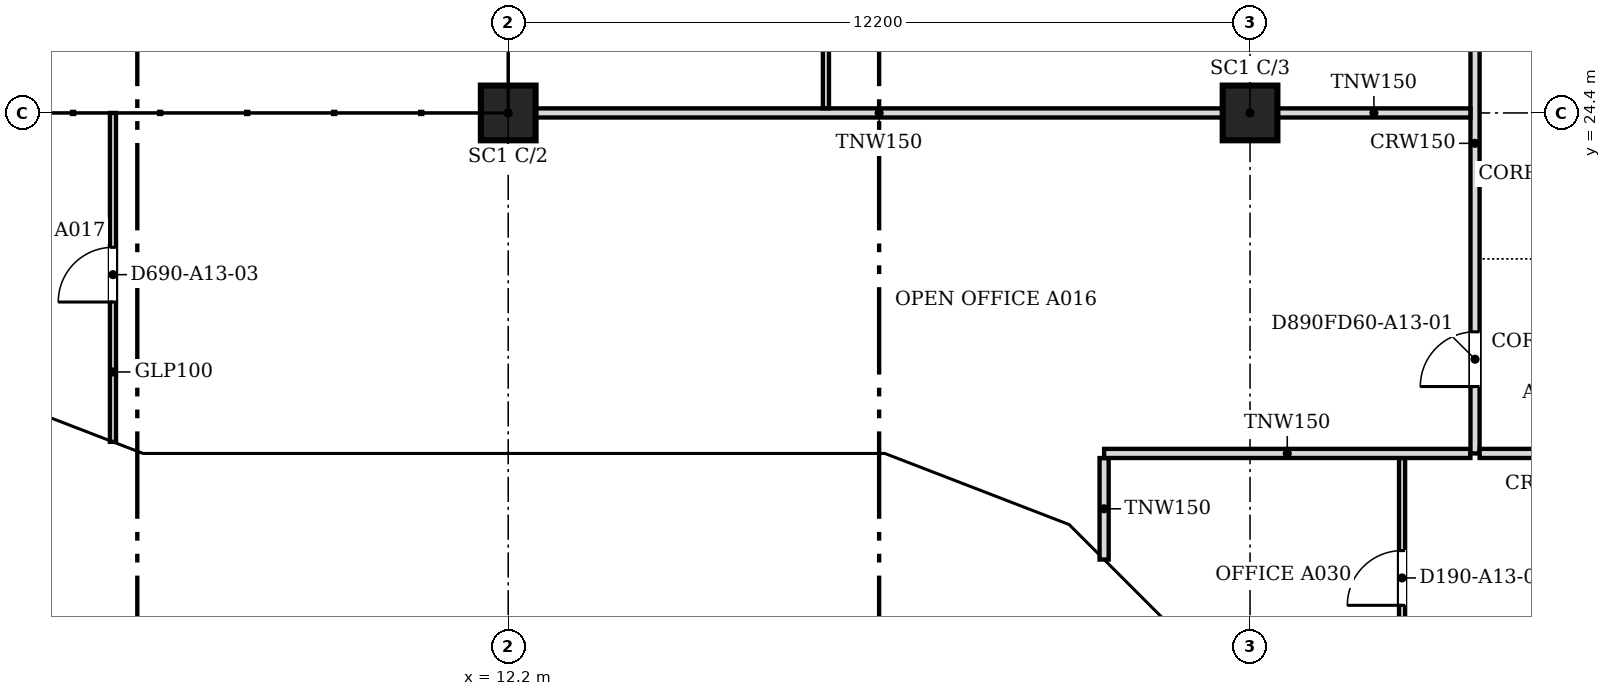
"""IFC4 building model, lengths in metres.
Left out: names, types, materials, properties, quantities, classifications, styles, units other than length and angle.
Written with IfcOpenShell. Run it as: python <this file> out.ifc"""

import sys

from ifc_helpers import new_model, si_unit, direction, frame, frame_2d, origin, origin_2d, place, context, subcontext, project, spatial, polyline, rectangle, outline, extrude, faceted_brep, source, transform, mapped, element, fill, save


model = new_model("IFC4")
c1 = context("Model", 3, precision=1e-05, world=origin(), true_north=direction((0.0, 1.0)))
c2 = subcontext(c1, "Body", "Model", "MODEL_VIEW")
j1 = project(units=[si_unit("LENGTHUNIT", "METRE"), si_unit("PLANEANGLEUNIT", "RADIAN")], contexts=[c1])
p1 = place(None, origin())
s1 = spatial("IfcSite", under=j1, at=p1, CompositionType="ELEMENT")
p2 = place(p1, origin())
s2 = spatial("IfcBuilding", under=s1, at=p2, CompositionType="ELEMENT")
p3 = place(p2, frame((0.0, 0.0, 143.0)))
s3 = spatial("IfcBuildingStorey", under=s2, at=p3, CompositionType="ELEMENT", Elevation=143.0)
for number, where, z_axis, x_axis in (
    (1, (12.2, 24.4, 0.0), (0.0, 0.0, 1.0), (1.0, 0.0, 0.0)),
    (2, (24.4, 24.4, 0.0), (0.0, 0.0, 1.0), (1.0, 0.0, 0.0)),
):
    element("IfcColumn", number, at=place(p3, frame(where, z_axis=z_axis, x_axis=x_axis)), inside=s3, PredefinedType="COLUMN", context=c2, shape_type="SweptSolid", body=[
        extrude(rectangle(XDim=0.9, YDim=0.9, at=origin_2d()), origin(), (0.0, 0.0, 1.0), 3.6),
    ])
m1 = source(origin(), c2, "Body", "Brep", [
    faceted_brep([(2.95, -0.25, 0.0), (2.997, -0.25, 0.059), (2.997, -0.25, 7.541), (2.95, -0.25, 7.6), (0.0, -0.25, 3.8), (0.053, 0.25, 3.868), (2.904, 0.25, 7.54), (2.904, 0.25, 0.06), (0.053, 0.25, 3.732), (2.95, 0.0, 0.0), (2.95, 0.0, 7.6), (0.0, 0.0, 3.8)], [[[0, 1, 2, 3, 4]], [[5, 6, 7, 8]], [[1, 0, 9]], [[10, 3, 2]], [[6, 5, 11, 4, 3, 10]], [[8, 7, 9, 0, 4, 11]], [[8, 11, 5]], [[1, 9, 7, 6, 10, 2]]]),
])
p4 = place(p3, frame((3.394, 19.612, -3.8), z_axis=(0.0, 0.0, 1.0), x_axis=(0.932990326376, -0.359901446078, 0.0)))
e3 = element("IfcWall", 3, at=p4, inside=s3, PredefinedType="SOLIDWALL", context=c2, shape_type="MappedRepresentation", body=[
    mapped(m1, transform((0.0, 0.0, 0.0), scale=1.0)),
])
m2 = source(origin(), c2, "Body", "SweptSolid", [
    extrude(outline(polyline([(2.75, 6.935), (0.316, 3.8), (2.75, 0.665), (2.75, 6.935)])), frame((0.0, 0.26, 0.0), z_axis=(0.0, -1.0, 0.0), x_axis=(1.0, 0.0, 0.0)), (0.0, 0.0, 1.0), 0.52),
])
p5 = place(p4, origin())
e4 = element("IfcOpeningElement", 4, at=p5, cuts=e3, PredefinedType="OPENING", context=c2, shape_type="MappedRepresentation", body=[
    mapped(m2, transform((0.0, 0.0, 0.0), scale=1.0)),
])
m3 = source(origin(), c2, "Body", "Brep", [
    faceted_brep([(0.047, -0.25, 0.0), (3.05, -0.25, 3.8), (0.047, -0.25, 7.6), (0.0, -0.25, 7.54), (0.0, -0.25, 0.06), (0.093, 0.25, 7.541), (3.05, 0.25, 3.8), (0.093, 0.25, 0.059), (0.047, 0.0, 0.0), (0.047, 0.0, 7.6)], [[[0, 1, 2, 3, 4]], [[5, 6, 7]], [[7, 6, 1, 0, 8]], [[6, 5, 9, 2, 1]], [[3, 2, 9]], [[8, 0, 4]], [[7, 8, 4, 3, 9, 5]]]),
])
p6 = place(p3, frame((6.1, 18.55, -3.8), z_axis=(0.0, 0.0, 1.0), x_axis=(1.0, 0.0, 0.0)))
e5 = element("IfcWall", 5, at=p6, inside=s3, PredefinedType="SOLIDWALL", context=c2, shape_type="MappedRepresentation", body=[
    mapped(m3, transform((0.0, 0.0, 0.0), scale=1.0)),
])
m4 = source(origin(), c2, "Body", "SweptSolid", [
    extrude(outline(polyline([(0.247, 0.656), (2.731, 3.8), (0.247, 6.944), (0.247, 0.656)])), frame((0.0, 0.26, 0.0), z_axis=(0.0, -1.0, 0.0), x_axis=(1.0, 0.0, 0.0)), (0.0, 0.0, 1.0), 0.52),
])
p7 = place(p6, origin())
e6 = element("IfcOpeningElement", 6, at=p7, cuts=e5, PredefinedType="OPENING", context=c2, shape_type="MappedRepresentation", body=[
    mapped(m4, transform((0.0, 0.0, 0.0), scale=1.0)),
])
m5 = source(origin(), c2, "Body", "SweptSolid", [
    extrude(outline(polyline([(3.05, 0.0), (6.1, 3.8), (3.05, 7.6), (0.0, 3.8), (3.05, 0.0)])), frame((0.0, 0.25, 0.0), z_axis=(0.0, -1.0, 0.0), x_axis=(1.0, 0.0, 0.0)), (0.0, 0.0, 1.0), 0.5),
])
p8 = place(p3, frame((9.15, 18.55, -3.8), z_axis=(0.0, 0.0, 1.0), x_axis=(1.0, 0.0, 0.0)))
e7 = element("IfcWall", 7, at=p8, inside=s3, PredefinedType="SOLIDWALL", context=c2, shape_type="MappedRepresentation", body=[
    mapped(m5, transform((0.0, 0.0, 0.0), scale=1.0)),
])
m6 = source(origin(), c2, "Body", "SweptSolid", [
    extrude(outline(polyline([(3.05, 0.399), (5.78, 3.8), (3.05, 7.201), (0.321, 3.8), (3.05, 0.399)])), frame((0.0, 0.26, 0.0), z_axis=(0.0, -1.0, 0.0), x_axis=(1.0, 0.0, 0.0)), (0.0, 0.0, 1.0), 0.52),
])
p9 = place(p8, origin())
e8 = element("IfcOpeningElement", 8, at=p9, cuts=e7, PredefinedType="OPENING", context=c2, shape_type="MappedRepresentation", body=[
    mapped(m6, transform((0.0, 0.0, 0.0), scale=1.0)),
])
m7 = source(origin(), c2, "Body", "Brep", [
    faceted_brep([(3.05, -0.25, 7.543), (0.0, -0.25, 3.8), (3.05, -0.25, 0.057), (0.0, 0.25, 3.8), (3.096, 0.25, 7.6), (3.143, 0.25, 7.544), (3.143, 0.25, 0.056), (3.096, 0.25, 0.0), (3.096, -0.0, 0.0), (3.096, -0.0, 7.6)], [[[0, 1, 2]], [[3, 4, 5, 6, 7]], [[7, 6, 8]], [[5, 4, 9]], [[4, 3, 1, 0, 9]], [[3, 7, 8, 2, 1]], [[2, 8, 6, 5, 9, 0]]]),
])
p10 = place(p3, frame((15.25, 18.55, -3.8), z_axis=(0.0, 0.0, 1.0), x_axis=(1.0, 0.0, 0.0)))
e9 = element("IfcWall", 9, at=p10, inside=s3, PredefinedType="SOLIDWALL", context=c2, shape_type="MappedRepresentation", body=[
    mapped(m7, transform((0.0, 0.0, 0.0), scale=1.0)),
])
m8 = source(origin(), c2, "Body", "SweptSolid", [
    extrude(outline(polyline([(2.896, 6.959), (0.323, 3.8), (2.896, 0.641), (2.896, 6.959)])), frame((0.0, 0.26, 0.0), z_axis=(0.0, -1.0, 0.0), x_axis=(1.0, 0.0, 0.0)), (0.0, 0.0, 1.0), 0.52),
])
p11 = place(p10, origin())
e10 = element("IfcOpeningElement", 10, at=p11, cuts=e9, PredefinedType="OPENING", context=c2, shape_type="MappedRepresentation", body=[
    mapped(m8, transform((0.0, 0.0, 0.0), scale=1.0)),
])
m9 = source(origin(), c2, "Body", "Brep", [
    faceted_brep([(0.093, -0.25, 0.056), (3.143, -0.25, 3.736), (3.143, -0.25, 3.864), (0.093, -0.25, 7.544), (0.0, 0.25, 7.543), (0.047, 0.25, 7.6), (3.196, 0.25, 3.8), (0.047, 0.25, 0.0), (0.0, 0.25, 0.057), (3.196, -0.0, 3.8), (0.047, 0.0, 0.0), (0.047, 0.0, 7.6)], [[[0, 1, 2, 3]], [[4, 5, 6, 7, 8]], [[7, 6, 9, 1, 0, 10]], [[6, 5, 11, 3, 2, 9]], [[5, 4, 11]], [[8, 7, 10]], [[8, 10, 0, 3, 11, 4]], [[1, 9, 2]]]),
])
p12 = place(p3, frame((18.303, 18.567, -3.8), z_axis=(0.0, 0.0, 1.0), x_axis=(0.932978940178, -0.359930961693, 0.0)))
e11 = element("IfcWall", 11, at=p12, inside=s3, PredefinedType="SOLIDWALL", context=c2, shape_type="MappedRepresentation", body=[
    mapped(m9, transform((0.0, 0.0, 0.0), scale=1.0)),
])
m10 = source(origin(), c2, "Body", "SweptSolid", [
    extrude(outline(polyline([(0.247, 0.633), (2.871, 3.8), (0.247, 6.967), (0.247, 0.633)])), frame((0.0, 0.26, 0.0), z_axis=(0.0, -1.0, 0.0), x_axis=(1.0, 0.0, 0.0)), (0.0, 0.0, 1.0), 0.52),
])
p13 = place(p12, origin())
e12 = element("IfcOpeningElement", 12, at=p13, cuts=e11, PredefinedType="OPENING", context=c2, shape_type="MappedRepresentation", body=[
    mapped(m10, transform((0.0, 0.0, 0.0), scale=1.0)),
])
m11 = source(origin(), c2, "Body", "Brep", [
    faceted_brep([(3.103, -0.25, 7.536), (0.053, -0.25, 3.864), (0.053, -0.25, 3.736), (3.103, -0.25, 0.064), (0.0, 0.25, 3.8), (3.156, 0.25, 7.6), (3.209, 0.25, 7.536), (3.209, 0.25, 0.064), (3.156, 0.25, 0.0), (3.156, -0.0, 0.0), (3.156, -0.0, 7.6), (0.0, 0.0, 3.8)], [[[0, 1, 2, 3]], [[4, 5, 6, 7, 8]], [[8, 7, 9]], [[6, 5, 10]], [[5, 4, 11, 1, 0, 10]], [[4, 8, 9, 3, 2, 11]], [[11, 2, 1]], [[3, 9, 7, 6, 10, 0]]]),
])
p14 = place(p3, frame((21.285, 17.417, -3.8), z_axis=(0.0, 0.0, 1.0), x_axis=(0.707106781187, -0.707106781187, 0.0)))
e13 = element("IfcWall", 13, at=p14, inside=s3, PredefinedType="SOLIDWALL", context=c2, shape_type="MappedRepresentation", body=[
    mapped(m11, transform((0.0, 0.0, 0.0), scale=1.0)),
])
m12 = source(origin(), c2, "Body", "SweptSolid", [
    extrude(outline(polyline([(2.956, 6.968), (0.325, 3.8), (2.956, 0.632), (2.956, 6.968)])), frame((0.0, 0.26, 0.0), z_axis=(0.0, -1.0, 0.0), x_axis=(1.0, 0.0, 0.0)), (0.0, 0.0, 1.0), 0.52),
])
p15 = place(p14, origin())
e14 = element("IfcOpeningElement", 14, at=p15, cuts=e13, PredefinedType="OPENING", context=c2, shape_type="MappedRepresentation", body=[
    mapped(m12, transform((0.0, 0.0, 0.0), scale=1.0)),
])
p16 = place(p2, frame((0.0, 0.0, 146.8)))
s4 = spatial("IfcBuildingStorey", under=s2, at=p16, CompositionType="ELEMENT", Elevation=146.8)
m13 = source(origin(), c2, "Body", "Brep", [
    faceted_brep([(0.053, -0.25, 0.0), (3.003, -0.25, 3.8), (0.053, -0.25, 7.6), (0.0, -0.25, 7.532), (0.0, -0.25, 0.068), (0.106, 0.25, 7.532), (2.957, 0.25, 3.86), (2.957, 0.25, 3.74), (0.106, 0.25, 0.068), (3.003, 0.0, 3.8), (0.053, 0.0, 0.0), (0.053, 0.0, 7.6)], [[[0, 1, 2, 3, 4]], [[5, 6, 7, 8]], [[8, 7, 9, 1, 0, 10]], [[6, 5, 11, 2, 1, 9]], [[3, 2, 11]], [[10, 0, 4]], [[8, 10, 4, 3, 11, 5]], [[9, 7, 6]]]),
])
p17 = place(p16, frame((3.344, 19.631, -3.8), z_axis=(0.0, 0.0, 1.0), x_axis=(0.933007896601, -0.359855894603, 0.0)))
e15 = element("IfcWall", 15, at=p17, inside=s4, PredefinedType="SOLIDWALL", context=c2, shape_type="MappedRepresentation", body=[
    mapped(m13, transform((0.0, 0.0, 0.0), scale=1.0)),
])
m14 = source(origin(), c2, "Body", "SweptSolid", [
    extrude(outline(polyline([(0.253, 0.665), (2.687, 3.8), (0.253, 6.935), (0.253, 0.665)])), frame((0.0, 0.26, 0.0), z_axis=(0.0, -1.0, 0.0), x_axis=(1.0, 0.0, 0.0)), (0.0, 0.0, 1.0), 0.52),
])
p18 = place(p17, origin())
e16 = element("IfcOpeningElement", 16, at=p18, cuts=e15, PredefinedType="OPENING", context=c2, shape_type="MappedRepresentation", body=[
    mapped(m14, transform((0.0, 0.0, 0.0), scale=1.0)),
])
m15 = source(origin(), c2, "Body", "Brep", [
    faceted_brep([(3.003, -0.25, 0.0), (6.053, -0.25, 3.8), (3.003, -0.25, 7.6), (0.0, -0.25, 3.8), (0.047, 0.25, 3.859), (3.003, 0.25, 7.6), (6.053, 0.25, 3.8), (3.003, 0.25, 0.0), (0.047, 0.25, 3.741), (0.0, 0.0, 3.8)], [[[0, 1, 2, 3]], [[4, 5, 6, 7, 8]], [[7, 6, 1, 0]], [[6, 5, 2, 1]], [[5, 4, 9, 3, 2]], [[8, 7, 0, 3, 9]], [[8, 9, 4]]]),
])
p19 = place(p16, frame((6.146, 18.55, -3.8), z_axis=(0.0, 0.0, 1.0), x_axis=(1.0, 0.0, 0.0)))
e17 = element("IfcWall", 17, at=p19, inside=s4, PredefinedType="SOLIDWALL", context=c2, shape_type="MappedRepresentation", body=[
    mapped(m15, transform((0.0, 0.0, 0.0), scale=1.0)),
])
m16 = source(origin(), c2, "Body", "SweptSolid", [
    extrude(outline(polyline([(3.005, 0.401), (5.733, 3.8), (3.005, 7.199), (0.319, 3.8), (3.005, 0.401)])), frame((0.0, 0.26, 0.0), z_axis=(0.0, -1.0, 0.0), x_axis=(1.0, 0.0, 0.0)), (0.0, 0.0, 1.0), 0.52),
])
p20 = place(p19, origin())
e18 = element("IfcOpeningElement", 18, at=p20, cuts=e17, PredefinedType="OPENING", context=c2, shape_type="MappedRepresentation", body=[
    mapped(m16, transform((0.0, 0.0, 0.0), scale=1.0)),
])
m17 = source(origin(), c2, "Body", "Brep", [
    faceted_brep([(3.05, -0.25, 0.0), (6.1, -0.25, 3.743), (6.1, -0.25, 3.857), (3.05, -0.25, 7.6), (0.0, -0.25, 3.8), (0.0, 0.25, 3.8), (3.05, 0.25, 7.6), (6.146, 0.25, 3.8), (3.05, 0.25, 0.0), (6.146, -0.0, 3.8)], [[[0, 1, 2, 3, 4]], [[5, 6, 7, 8]], [[8, 7, 9, 1, 0]], [[7, 6, 3, 2, 9]], [[6, 5, 4, 3]], [[5, 8, 0, 4]], [[1, 9, 2]]]),
])
p21 = place(p16, frame((12.2, 18.55, -3.8), z_axis=(0.0, 0.0, 1.0), x_axis=(1.0, 0.0, 0.0)))
e19 = element("IfcWall", 19, at=p21, inside=s4, PredefinedType="SOLIDWALL", context=c2, shape_type="MappedRepresentation", body=[
    mapped(m17, transform((0.0, 0.0, 0.0), scale=1.0)),
])
m18 = source(origin(), c2, "Body", "SweptSolid", [
    extrude(outline(polyline([(3.052, 0.397), (5.824, 3.8), (3.052, 7.202), (0.321, 3.8), (3.052, 0.397)])), frame((0.0, 0.26, 0.0), z_axis=(0.0, -1.0, 0.0), x_axis=(1.0, 0.0, 0.0)), (0.0, 0.0, 1.0), 0.52),
])
p22 = place(p21, origin())
e20 = element("IfcOpeningElement", 20, at=p22, cuts=e19, PredefinedType="OPENING", context=c2, shape_type="MappedRepresentation", body=[
    mapped(m18, transform((0.0, 0.0, 0.0), scale=1.0)),
])
m19 = source(origin(), c2, "Body", "Brep", [
    faceted_brep([(3.096, -0.25, 7.536), (0.047, -0.25, 3.856), (0.047, -0.25, 3.744), (3.096, -0.25, 0.064), (0.0, 0.25, 3.8), (3.149, 0.25, 7.6), (3.202, 0.25, 7.536), (3.202, 0.25, 0.064), (3.149, 0.25, 0.0), (3.149, -0.0, 0.0), (3.149, -0.0, 7.6), (0.0, 0.0, 3.8)], [[[0, 1, 2, 3]], [[4, 5, 6, 7, 8]], [[8, 7, 9]], [[6, 5, 10]], [[5, 4, 11, 1, 0, 10]], [[4, 8, 9, 3, 2, 11]], [[11, 2, 1]], [[3, 9, 7, 6, 10, 0]]]),
])
p23 = place(p16, frame((18.346, 18.55, -3.8), z_axis=(0.0, 0.0, 1.0), x_axis=(0.932985567668, -0.359913782069, 0.0)))
e21 = element("IfcWall", 21, at=p23, inside=s4, PredefinedType="SOLIDWALL", context=c2, shape_type="MappedRepresentation", body=[
    mapped(m19, transform((0.0, 0.0, 0.0), scale=1.0)),
])
m20 = source(origin(), c2, "Body", "SweptSolid", [
    extrude(outline(polyline([(2.949, 6.967), (0.325, 3.8), (2.949, 0.633), (2.949, 6.967)])), frame((0.0, 0.26, 0.0), z_axis=(0.0, -1.0, 0.0), x_axis=(1.0, 0.0, 0.0)), (0.0, 0.0, 1.0), 0.52),
])
p24 = place(p23, origin())
e22 = element("IfcOpeningElement", 22, at=p24, cuts=e21, PredefinedType="OPENING", context=c2, shape_type="MappedRepresentation", body=[
    mapped(m20, transform((0.0, 0.0, 0.0), scale=1.0)),
])
m21 = source(origin(), c2, "Body", "Brep", [
    faceted_brep([(0.106, -0.25, 0.064), (3.156, -0.25, 3.736), (3.156, -0.25, 3.864), (0.106, -0.25, 7.536), (0.0, 0.25, 7.536), (0.053, 0.25, 7.6), (3.209, 0.25, 3.8), (0.053, 0.25, 0.0), (0.0, 0.25, 0.064), (3.209, -0.0, 3.8), (0.053, 0.0, 0.0), (0.053, 0.0, 7.6)], [[[0, 1, 2, 3]], [[4, 5, 6, 7, 8]], [[7, 6, 9, 1, 0, 10]], [[6, 5, 11, 3, 2, 9]], [[5, 4, 11]], [[8, 7, 10]], [[8, 10, 0, 3, 11, 4]], [[1, 9, 2]]]),
])
p25 = place(p16, frame((21.248, 17.454, -3.8), z_axis=(0.0, 0.0, 1.0), x_axis=(0.707106781187, -0.707106781187, 0.0)))
e23 = element("IfcWall", 23, at=p25, inside=s4, PredefinedType="SOLIDWALL", context=c2, shape_type="MappedRepresentation", body=[
    mapped(m21, transform((0.0, 0.0, 0.0), scale=1.0)),
])
m22 = source(origin(), c2, "Body", "SweptSolid", [
    extrude(outline(polyline([(0.253, 0.632), (2.884, 3.8), (0.253, 6.968), (0.253, 0.632)])), frame((0.0, 0.26, 0.0), z_axis=(0.0, -1.0, 0.0), x_axis=(1.0, 0.0, 0.0)), (0.0, 0.0, 1.0), 0.52),
])
p26 = place(p25, origin())
e24 = element("IfcOpeningElement", 24, at=p26, cuts=e23, PredefinedType="OPENING", context=c2, shape_type="MappedRepresentation", body=[
    mapped(m22, transform((0.0, 0.0, 0.0), scale=1.0)),
])
p27 = place(p3, frame((26.9, 10.276, 0.0), z_axis=(0.0, 0.0, 1.0), x_axis=(0.0, 1.0, 0.0)))
e25 = element("IfcWall", 25, at=p27, inside=s3, PredefinedType="PARTITIONING", context=c2, shape_type="SweptSolid", body=[
    extrude(rectangle(XDim=8.448, YDim=0.1, at=frame_2d((4.224, 0.0))), origin(), (0.0, 0.0, 1.0), 3.067),
])
m23 = source(origin(), c2, "Body", "SweptSolid", [
    extrude(rectangle(XDim=0.9, YDim=2.1, at=frame_2d((0.45, 1.05))), frame((0.0, 0.06, 0.0), z_axis=(0.0, -1.0, 0.0), x_axis=(1.0, 0.0, 0.0)), (0.0, 0.0, 1.0), 0.12),
])
p28 = place(p27, frame((6.026, 0.0, 0.0)))
e26 = element("IfcOpeningElement", 26, at=p28, cuts=e25, PredefinedType="OPENING", context=c2, shape_type="MappedRepresentation", body=[
    mapped(m23, transform((0.0, 0.0, 0.0), scale=1.0)),
])
p29 = place(p27, frame((1.8, 0.0, 0.0)))
e27 = element("IfcOpeningElement", 27, at=p29, cuts=e25, PredefinedType="OPENING", context=c2, shape_type="MappedRepresentation", body=[
    mapped(m23, transform((0.0, 0.0, 0.0), scale=1.0)),
])
p30 = place(p3, frame((22.0, 17.055, 0.0), z_axis=(0.0, 0.0, 1.0), x_axis=(0.0, 1.0, 0.0)))
e28 = element("IfcWall", 28, at=p30, inside=s3, PredefinedType="PARTITIONING", context=c2, shape_type="SweptSolid", body=[
    extrude(rectangle(XDim=1.669, YDim=0.15, at=frame_2d((0.834, 0.0))), origin(), (0.0, 0.0, 1.0), 3.067),
])
p31 = place(p3, frame((22.0, 18.8, 0.0), z_axis=(0.0, 0.0, 1.0), x_axis=(1.0, 0.0, 0.0)))
e29 = element("IfcWall", 29, at=p31, inside=s3, PredefinedType="PARTITIONING", context=c2, shape_type="SweptSolid", body=[
    extrude(rectangle(XDim=6.024, YDim=0.15, at=frame_2d((3.012, 0.0))), origin(), (0.0, 0.0, 1.0), 3.067),
])
p32 = place(p3, frame((28.1, 18.8, 0.0), z_axis=(0.0, 0.0, 1.0), x_axis=(0.0, 1.0, 0.0)))
e30 = element("IfcWall", 30, at=p32, inside=s3, PredefinedType="PARTITIONING", context=c2, shape_type="SweptSolid", body=[
    extrude(rectangle(XDim=26.024, YDim=0.15, at=frame_2d((13.012, 0.0))), origin(), (0.0, 0.0, 1.0), 3.067),
])
m24 = source(origin(), c2, "Body", "SweptSolid", [
    extrude(rectangle(XDim=0.9, YDim=2.1, at=frame_2d((0.45, 1.05))), frame((0.0, 0.085, 0.0), z_axis=(0.0, -1.0, 0.0), x_axis=(1.0, 0.0, 0.0)), (0.0, 0.0, 1.0), 0.17),
])
p33 = place(p32, frame((1.1, 0.0, 0.0)))
e31 = element("IfcOpeningElement", 31, at=p33, cuts=e30, PredefinedType="OPENING", context=c2, shape_type="MappedRepresentation", body=[
    mapped(m24, transform((0.0, 0.0, 0.0), scale=1.0)),
])
m25 = source(origin(), c2, "Body", "SweptSolid", [
    extrude(rectangle(XDim=1.0, YDim=2.1, at=frame_2d((0.5, 1.05))), frame((0.0, 0.085, 0.0), z_axis=(0.0, -1.0, 0.0), x_axis=(1.0, 0.0, 0.0)), (0.0, 0.0, 1.0), 0.17),
])
p34 = place(p32, frame((14.201, 0.0, 0.0)))
e32 = element("IfcOpeningElement", 32, at=p34, cuts=e30, PredefinedType="OPENING", context=c2, shape_type="MappedRepresentation", body=[
    mapped(m25, transform((0.0, 0.0, 0.0), scale=1.0)),
])
p35 = place(p32, frame((8.2, 0.0, 0.0)))
e33 = element("IfcOpeningElement", 33, at=p35, cuts=e30, PredefinedType="OPENING", context=c2, shape_type="MappedRepresentation", body=[
    mapped(m24, transform((0.0, 0.0, 0.0), scale=1.0)),
])
p36 = place(p32, frame((21.4, 0.0, 0.0)))
e34 = element("IfcOpeningElement", 34, at=p36, cuts=e30, PredefinedType="OPENING", context=c2, shape_type="MappedRepresentation", body=[
    mapped(m25, transform((0.0, 0.0, 0.0), scale=1.0)),
])
p37 = place(p3, frame((28.176, 18.8, 0.0), z_axis=(0.0, 0.0, 1.0), x_axis=(1.0, 0.0, 0.0)))
e35 = element("IfcWall", 35, at=p37, inside=s3, PredefinedType="PARTITIONING", context=c2, shape_type="SweptSolid", body=[
    extrude(rectangle(XDim=2.248, YDim=0.15, at=frame_2d((1.124, 0.0))), origin(), (0.0, 0.0, 1.0), 3.067),
])
p38 = place(p3, frame((5.7, 18.99, 0.0), z_axis=(0.0, 0.0, 1.0), x_axis=(0.0, 1.0, 0.0)))
e36 = element("IfcWall", 36, at=p38, inside=s3, PredefinedType="PARTITIONING", context=c2, shape_type="SweptSolid", body=[
    extrude(rectangle(XDim=5.41, YDim=0.1, at=frame_2d((2.705, 0.0))), origin(), (0.0, 0.0, 1.0), 3.067),
])
p39 = place(p38, frame((2.3, 0.0, 0.0)))
e37 = element("IfcOpeningElement", 37, at=p39, cuts=e36, PredefinedType="OPENING", context=c2, shape_type="MappedRepresentation", body=[
    mapped(m23, transform((0.0, 0.0, 0.0), scale=1.0)),
])
p40 = place(p3, frame((12.651, 24.4, 0.0), z_axis=(0.0, 0.0, 1.0), x_axis=(1.0, 0.0, 0.0)))
e38 = element("IfcWall", 38, at=p40, inside=s3, PredefinedType="PARTITIONING", context=c2, shape_type="SweptSolid", body=[
    extrude(rectangle(XDim=11.298, YDim=0.15, at=frame_2d((5.649, 0.0))), origin(), (0.0, 0.0, 1.0), 3.067),
])
p41 = place(p3, frame((24.851, 24.4, 0.0), z_axis=(0.0, 0.0, 1.0), x_axis=(1.0, 0.0, 0.0)))
e39 = element("IfcWall", 39, at=p41, inside=s3, PredefinedType="PARTITIONING", context=c2, shape_type="SweptSolid", body=[
    extrude(rectangle(XDim=3.173, YDim=0.15, at=frame_2d((1.586, 0.0))), origin(), (0.0, 0.0, 1.0), 3.067),
])
p42 = place(p3, frame((17.425, 24.476, 0.0), z_axis=(0.0, 0.0, 1.0), x_axis=(0.0, 1.0, 0.0)))
e40 = element("IfcWall", 40, at=p42, inside=s3, PredefinedType="PARTITIONING", context=c2, shape_type="SweptSolid", body=[
    extrude(rectangle(XDim=5.948, YDim=0.1, at=frame_2d((2.974, 0.0))), origin(), (0.0, 0.0, 1.0), 3.067),
])
p43 = place(p42, frame((2.5, 0.0, 0.0)))
e41 = element("IfcOpeningElement", 41, at=p43, cuts=e40, PredefinedType="OPENING", context=c2, shape_type="MappedRepresentation", body=[
    mapped(m23, transform((0.0, 0.0, 0.0), scale=1.0)),
])
m26 = source(origin(), c2, "Body", "SweptSolid", [
    extrude(rectangle(XDim=0.9, YDim=2.1, at=frame_2d((0.45, 1.05))), frame((0.0, 0.025, 0.0), z_axis=(0.0, -1.0, 0.0), x_axis=(1.0, 0.0, 0.0)), (0.0, 0.0, 1.0), 0.05),
])
p44 = place(p33, origin())
e42 = element("IfcDoor", 42, at=p44, inside=s3, OperationType="SINGLE_SWING_LEFT", PredefinedType="DOOR", context=c2, shape_type="MappedRepresentation", body=[
    mapped(m26, transform((0.0, 0.0, 0.0), scale=1.0)),
])
fill(e31, e42)
p45 = place(p28, origin())
e43 = element("IfcDoor", 43, at=p45, inside=s3, OperationType="SINGLE_SWING_LEFT", PredefinedType="DOOR", context=c2, shape_type="MappedRepresentation", body=[
    mapped(m26, transform((0.0, 0.0, 0.0), scale=1.0)),
])
fill(e26, e43)
p46 = place(p39, origin())
e44 = element("IfcDoor", 44, at=p46, inside=s3, OperationType="SINGLE_SWING_LEFT", PredefinedType="DOOR", context=c2, shape_type="MappedRepresentation", body=[
    mapped(m26, transform((0.0, 0.0, 0.0), scale=1.0)),
])
fill(e37, e44)
save(model, sys.argv[1])
